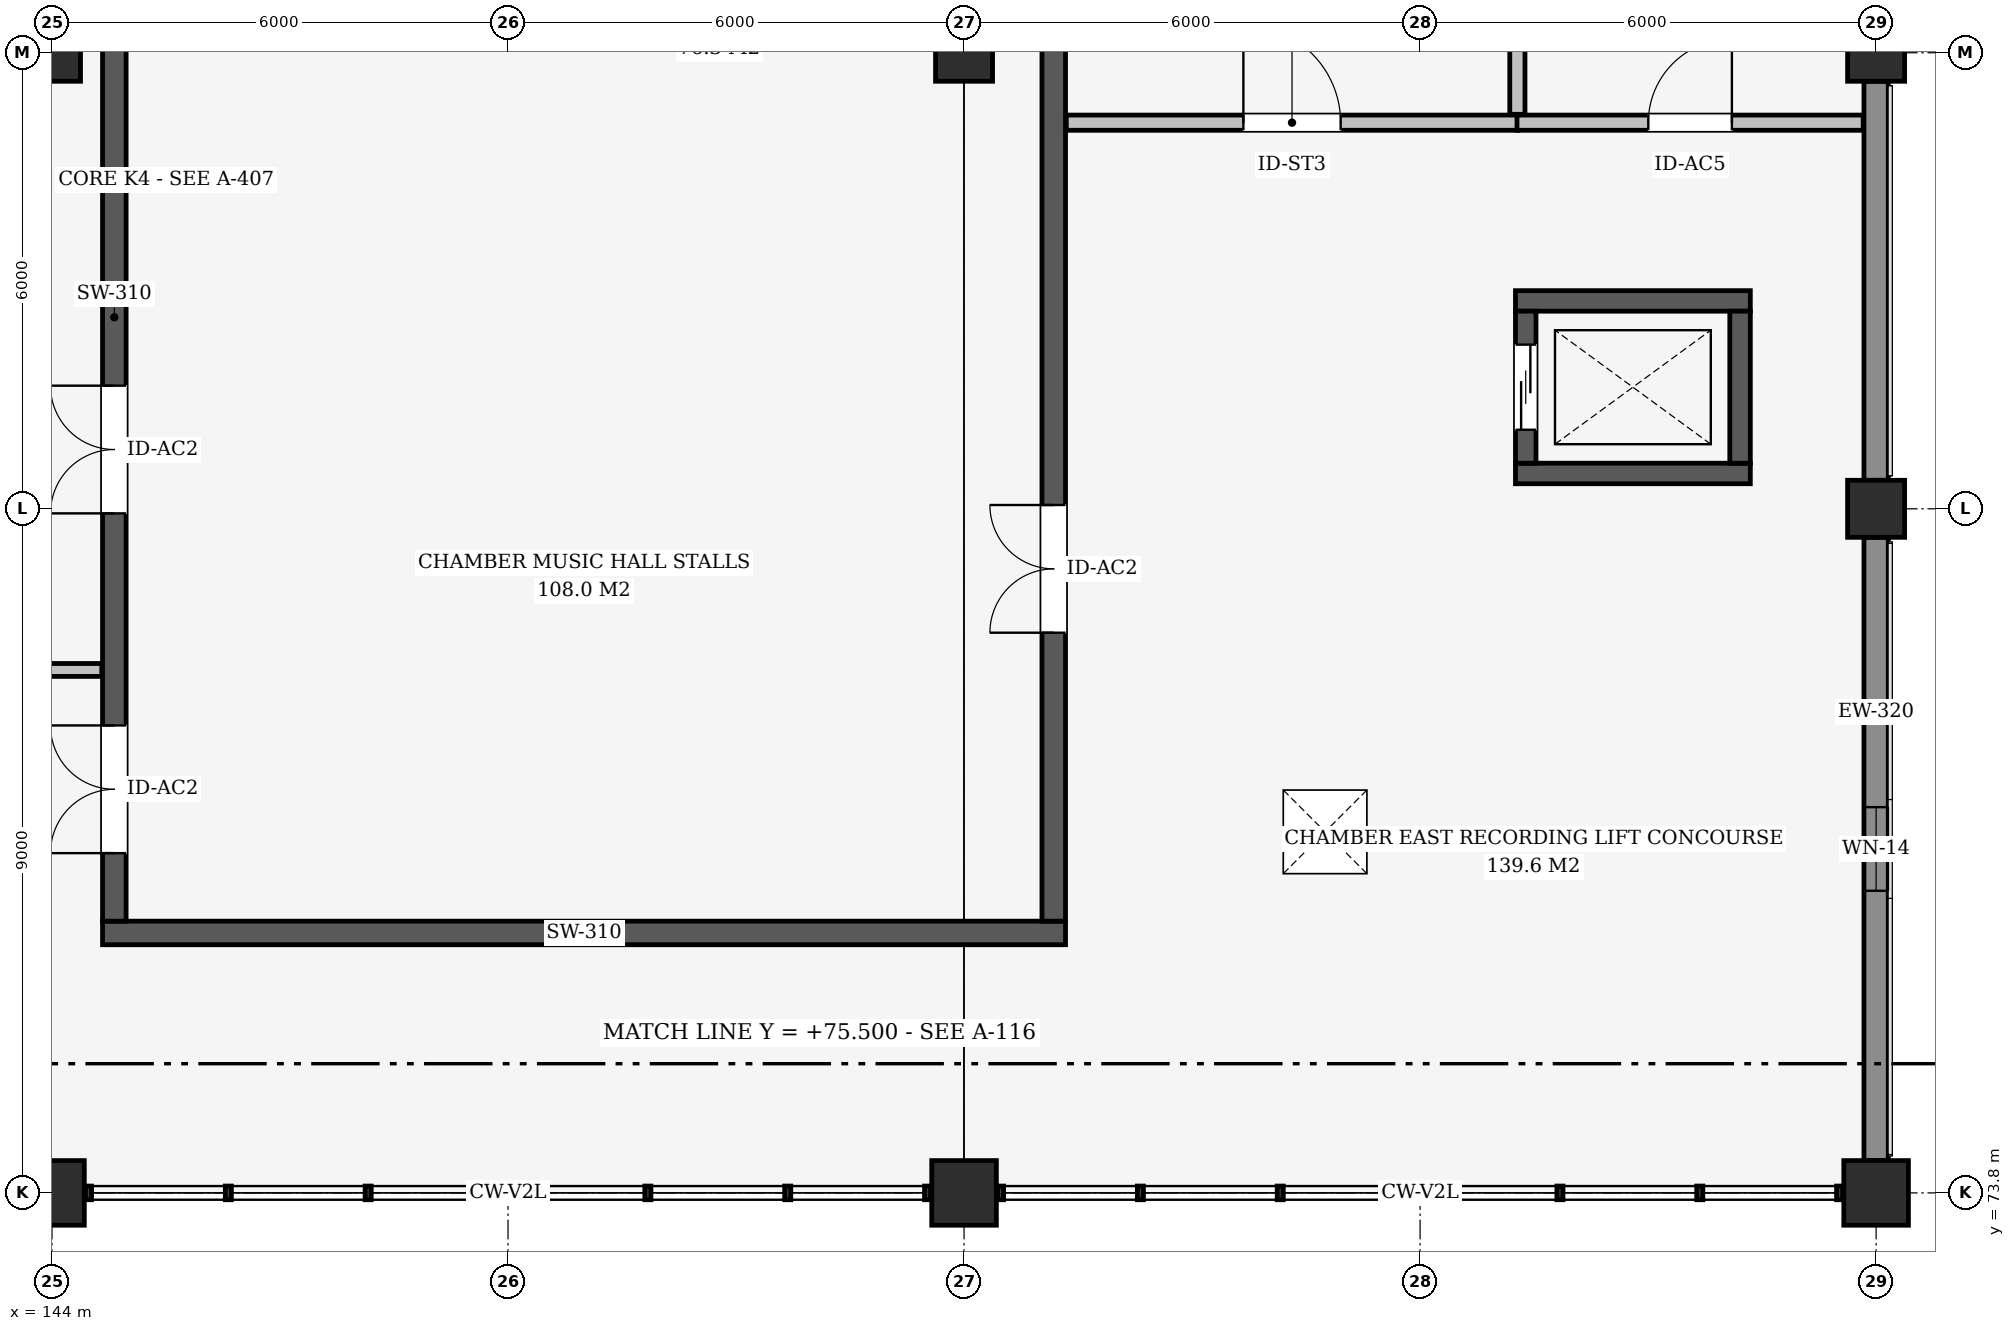
"""IFC4 building model, lengths in metres.
Left out: names, types, materials, properties, quantities, classifications, styles, units other than length and angle.
Written with IfcOpenShell. Run it as: python <this file> out.ifc"""

import sys

from ifc_helpers import new_model, si_unit, direction, frame, frame_2d, origin, origin_2d, place, context, subcontext, project, spatial, rectangle, extrude, element, fill, save


model = new_model("IFC4")
c1 = context("Model", 3, precision=1e-05, world=origin(), true_north=direction((0.0, 1.0)))
c2 = subcontext(c1, "Body", "Model", "MODEL_VIEW")
j1 = project(units=[si_unit("LENGTHUNIT", "METRE"), si_unit("PLANEANGLEUNIT", "RADIAN")], contexts=[c1])
p1 = place(None, origin())
s1 = spatial("IfcSite", under=j1, at=p1, CompositionType="ELEMENT")
p2 = place(p1, origin())
s2 = spatial("IfcBuilding", under=s1, at=p2, CompositionType="ELEMENT")
p3 = place(p2, origin())
s3 = spatial("IfcBuildingStorey", under=s2, at=p3, CompositionType="ELEMENT", Elevation=0.0)
p4 = place(p3, frame((144.0, 73.8, 0.0), z_axis=(0.0, 0.0, 1.0), x_axis=(1.0, 0.0, 0.0)))
e1 = element("IfcColumn", 1, at=p4, inside=s3, PredefinedType="COLUMN", context=c2, shape_type="SweptSolid", body=[
    extrude(rectangle(XDim=0.85, YDim=0.85, at=origin_2d()), origin(), (0.0, 0.0, 1.0), 4.8),
])
p5 = place(p3, frame((144.0, 88.8, 0.0), z_axis=(0.0, 0.0, 1.0), x_axis=(1.0, 0.0, 0.0)))
e2 = element("IfcColumn", 2, at=p5, inside=s3, PredefinedType="COLUMN", context=c2, shape_type="SweptSolid", body=[
    extrude(rectangle(XDim=0.75, YDim=0.75, at=origin_2d()), origin(), (0.0, 0.0, 1.0), 4.8),
])
p6 = place(p3, frame((156.0, 73.8, 0.0), z_axis=(0.0, 0.0, 1.0), x_axis=(1.0, 0.0, 0.0)))
e3 = element("IfcColumn", 3, at=p6, inside=s3, PredefinedType="COLUMN", context=c2, shape_type="SweptSolid", body=[
    extrude(rectangle(XDim=0.85, YDim=0.85, at=origin_2d()), origin(), (0.0, 0.0, 1.0), 4.8),
])
p7 = place(p3, frame((156.0, 88.8, 0.0), z_axis=(0.0, 0.0, 1.0), x_axis=(1.0, 0.0, 0.0)))
e4 = element("IfcColumn", 4, at=p7, inside=s3, PredefinedType="COLUMN", context=c2, shape_type="SweptSolid", body=[
    extrude(rectangle(XDim=0.75, YDim=0.75, at=origin_2d()), origin(), (0.0, 0.0, 1.0), 4.8),
])
p8 = place(p3, frame((168.0, 73.8, 0.0), z_axis=(0.0, 0.0, 1.0), x_axis=(1.0, 0.0, 0.0)))
e5 = element("IfcColumn", 5, at=p8, inside=s3, PredefinedType="COLUMN", context=c2, shape_type="SweptSolid", body=[
    extrude(rectangle(XDim=0.85, YDim=0.85, at=origin_2d()), origin(), (0.0, 0.0, 1.0), 4.8),
])
for number, where, z_axis, x_axis in (
    (6, (168.0, 82.8, 0.0), (0.0, 0.0, 1.0), (1.0, 0.0, 0.0)),
    (7, (168.0, 88.8, 0.0), (0.0, 0.0, 1.0), (1.0, 0.0, 0.0)),
):
    element("IfcColumn", number, at=place(p3, frame(where, z_axis=z_axis, x_axis=x_axis)), inside=s3, PredefinedType="COLUMN", context=c2, shape_type="SweptSolid", body=[
        extrude(rectangle(XDim=0.75, YDim=0.75, at=origin_2d()), origin(), (0.0, 0.0, 1.0), 4.8),
    ])
p9 = place(p3, frame((144.665, 77.22, 0.0), z_axis=(0.0, 0.0, 1.0), x_axis=(1.0, 0.0, 0.0)))
e8 = element("IfcWall", 8, at=p9, inside=s3, PredefinedType="SHEAR", context=c2, shape_type="SweptSolid", body=[
    extrude(rectangle(XDim=12.67, YDim=0.31, at=frame_2d((6.335, 0.0))), origin(), (0.0, 0.0, 1.0), 4.5),
])
p10 = place(p3, frame((144.82, 77.375, 0.0), z_axis=(0.0, 0.0, 1.0), x_axis=(0.0, 1.0, 0.0)))
e9 = element("IfcWall", 9, at=p10, inside=s3, PredefinedType="SHEAR", context=c2, shape_type="SweptSolid", body=[
    extrude(rectangle(XDim=15.89, YDim=0.31, at=frame_2d((7.945, 0.0))), origin(), (0.0, 0.0, 1.0), 4.5),
])
p11 = place(p10, frame((0.895, 0.0, 0.0)))
e10 = element("IfcOpeningElement", 10, at=p11, cuts=e9, PredefinedType="OPENING", context=c2, shape_type="SweptSolid", body=[
    extrude(rectangle(XDim=1.68, YDim=2.32, at=frame_2d((0.84, 1.16))), frame((0.0, 0.165, 0.0), z_axis=(0.0, -1.0, 0.0), x_axis=(1.0, 0.0, 0.0)), (0.0, 0.0, 1.0), 0.33),
])
p12 = place(p10, frame((5.365, 0.0, 0.0)))
e11 = element("IfcOpeningElement", 11, at=p12, cuts=e9, PredefinedType="OPENING", context=c2, shape_type="SweptSolid", body=[
    extrude(rectangle(XDim=1.68, YDim=2.32, at=frame_2d((0.84, 1.16))), frame((0.0, 0.165, 0.0), z_axis=(0.0, -1.0, 0.0), x_axis=(1.0, 0.0, 0.0)), (0.0, 0.0, 1.0), 0.33),
])
p13 = place(p10, frame((12.458, 0.0, 0.0)))
e12 = element("IfcOpeningElement", 12, at=p13, cuts=e9, PredefinedType="OPENING", context=c2, shape_type="SweptSolid", body=[
    extrude(rectangle(XDim=1.68, YDim=2.32, at=frame_2d((0.84, 1.16))), frame((0.0, 0.165, 0.0), z_axis=(0.0, -1.0, 0.0), x_axis=(1.0, 0.0, 0.0)), (0.0, 0.0, 1.0), 0.33),
])
p14 = place(p3, frame((157.18, 77.375, 0.0), z_axis=(0.0, 0.0, 1.0), x_axis=(0.0, 1.0, 0.0)))
e13 = element("IfcWall", 13, at=p14, inside=s3, PredefinedType="SHEAR", context=c2, shape_type="SweptSolid", body=[
    extrude(rectangle(XDim=15.89, YDim=0.31, at=frame_2d((7.945, 0.0))), origin(), (0.0, 0.0, 1.0), 4.5),
])
p15 = place(p14, frame((3.795, 0.0, 0.0)))
e14 = element("IfcOpeningElement", 14, at=p15, cuts=e13, PredefinedType="OPENING", context=c2, shape_type="SweptSolid", body=[
    extrude(rectangle(XDim=1.68, YDim=2.32, at=frame_2d((0.84, 1.16))), frame((0.0, 0.165, 0.0), z_axis=(0.0, -1.0, 0.0), x_axis=(1.0, 0.0, 0.0)), (0.0, 0.0, 1.0), 0.33),
])
p16 = place(p3, frame((168.0, 82.425, 0.0), z_axis=(0.0, 0.0, 1.0), x_axis=(0.0, -1.0, 0.0)))
e15 = element("IfcWall", 15, at=p16, inside=s3, PredefinedType="SOLIDWALL", context=c2, shape_type="SweptSolid", body=[
    extrude(rectangle(XDim=8.2, YDim=0.32, at=frame_2d((4.1, 0.0))), origin(), (0.0, 0.0, 1.0), 3.909),
])
p17 = place(p16, frame((3.55, 0.0, 0.6)))
e16 = element("IfcOpeningElement", 16, at=p17, cuts=e15, PredefinedType="OPENING", context=c2, shape_type="SweptSolid", body=[
    extrude(rectangle(XDim=1.1, YDim=2.4, at=frame_2d((0.55, 1.2))), frame((0.0, 0.17, 0.0), z_axis=(0.0, -1.0, 0.0), x_axis=(1.0, 0.0, 0.0)), (0.0, 0.0, 1.0), 0.34),
])
p18 = place(p3, frame((168.0, 88.425, 0.0), z_axis=(0.0, 0.0, 1.0), x_axis=(0.0, -1.0, 0.0)))
e17 = element("IfcWall", 17, at=p18, inside=s3, PredefinedType="SOLIDWALL", context=c2, shape_type="SweptSolid", body=[
    extrude(rectangle(XDim=5.25, YDim=0.32, at=frame_2d((2.625, 0.0))), origin(), (0.0, 0.0, 1.0), 3.908),
])
for number, where, z_axis, x_axis in (
    (18, (163.255, 83.265, 0.0), (0.0, 0.0, 1.0), (1.0, 0.0, 0.0)),
    (19, (163.255, 85.535, 0.0), (0.0, 0.0, 1.0), (1.0, 0.0, 0.0)),
):
    element("IfcWall", number, at=place(p3, frame(where, z_axis=z_axis, x_axis=x_axis)), inside=s3, PredefinedType="SHEAR", context=c2, shape_type="SweptSolid", body=[
        extrude(rectangle(XDim=3.09, YDim=0.27, at=frame_2d((1.545, 0.0))), origin(), (0.0, 0.0, 1.0), 4.54),
    ])
p19 = place(p3, frame((163.39, 83.4, 0.0), z_axis=(0.0, 0.0, 1.0), x_axis=(0.0, 1.0, 0.0)))
e20 = element("IfcWall", 20, at=p19, inside=s3, PredefinedType="SHEAR", context=c2, shape_type="SweptSolid", body=[
    extrude(rectangle(XDim=2.0, YDim=0.27, at=frame_2d((1.0, 0.0))), origin(), (0.0, 0.0, 1.0), 4.54),
])
p20 = place(p19, frame((0.44, 0.0, 0.0)))
e21 = element("IfcOpeningElement", 21, at=p20, cuts=e20, PredefinedType="OPENING", context=c2, shape_type="SweptSolid", body=[
    extrude(rectangle(XDim=1.12, YDim=2.15, at=frame_2d((0.56, 1.075))), frame((0.0, 0.145, 0.0), z_axis=(0.0, -1.0, 0.0), x_axis=(1.0, 0.0, 0.0)), (0.0, 0.0, 1.0), 0.29),
])
p21 = place(p3, frame((166.21, 83.4, 0.0), z_axis=(0.0, 0.0, 1.0), x_axis=(0.0, 1.0, 0.0)))
e22 = element("IfcWall", 22, at=p21, inside=s3, PredefinedType="SHEAR", context=c2, shape_type="SweptSolid", body=[
    extrude(rectangle(XDim=2.0, YDim=0.27, at=frame_2d((1.0, 0.0))), origin(), (0.0, 0.0, 1.0), 4.54),
])
p22 = place(p3, frame((131.95, 80.68, 0.0), z_axis=(0.0, 0.0, 1.0), x_axis=(1.0, 0.0, 0.0)))
e23 = element("IfcWall", 23, at=p22, inside=s3, PredefinedType="PARTITIONING", context=c2, shape_type="SweptSolid", body=[
    extrude(rectangle(XDim=12.705, YDim=0.17, at=frame_2d((6.353, 0.0))), origin(), (0.0, 0.0, 1.0), 4.52),
])
p23 = place(p3, frame((157.345, 87.88, 0.0), z_axis=(0.0, 0.0, 1.0), x_axis=(1.0, 0.0, 0.0)))
e24 = element("IfcWall", 24, at=p23, inside=s3, PredefinedType="PARTITIONING", context=c2, shape_type="SweptSolid", body=[
    extrude(rectangle(XDim=5.94, YDim=0.2, at=frame_2d((2.97, 0.0))), origin(), (0.0, 0.0, 1.0), 4.52),
])
p24 = place(p23, frame((2.33, 0.0, 0.0)))
e25 = element("IfcOpeningElement", 25, at=p24, cuts=e24, PredefinedType="OPENING", context=c2, shape_type="SweptSolid", body=[
    extrude(rectangle(XDim=1.28, YDim=2.26, at=frame_2d((0.64, 1.13))), frame((0.0, 0.11, 0.0), z_axis=(0.0, -1.0, 0.0), x_axis=(1.0, 0.0, 0.0)), (0.0, 0.0, 1.0), 0.22),
])
p25 = place(p3, frame((163.275, 87.88, 0.0), z_axis=(0.0, 0.0, 1.0), x_axis=(1.0, 0.0, 0.0)))
e26 = element("IfcWall", 26, at=p25, inside=s3, PredefinedType="PARTITIONING", context=c2, shape_type="SweptSolid", body=[
    extrude(rectangle(XDim=4.555, YDim=0.2, at=frame_2d((2.278, 0.0))), origin(), (0.0, 0.0, 1.0), 4.52),
])
p26 = place(p25, frame((1.728, 0.0, 0.0)))
e27 = element("IfcOpeningElement", 27, at=p26, cuts=e26, PredefinedType="OPENING", context=c2, shape_type="SweptSolid", body=[
    extrude(rectangle(XDim=1.1, YDim=2.26, at=frame_2d((0.55, 1.13))), frame((0.0, 0.11, 0.0), z_axis=(0.0, -1.0, 0.0), x_axis=(1.0, 0.0, 0.0)), (0.0, 0.0, 1.0), 0.22),
])
p27 = place(p3, frame((163.28, 87.99, 0.0), z_axis=(0.0, 0.0, 1.0), x_axis=(0.0, 1.0, 0.0)))
e28 = element("IfcWall", 28, at=p27, inside=s3, PredefinedType="PARTITIONING", context=c2, shape_type="SweptSolid", body=[
    extrude(rectangle(XDim=9.04, YDim=0.2, at=frame_2d((4.52, 0.0))), origin(), (0.0, 0.0, 1.0), 3.984),
])
p28 = place(p27, frame((3.97, 0.0, 0.0)))
e29 = element("IfcOpeningElement", 29, at=p28, cuts=e28, PredefinedType="OPENING", context=c2, shape_type="SweptSolid", body=[
    extrude(rectangle(XDim=1.1, YDim=2.26, at=frame_2d((0.55, 1.13))), frame((0.0, 0.11, 0.0), z_axis=(0.0, -1.0, 0.0), x_axis=(1.0, 0.0, 0.0)), (0.0, 0.0, 1.0), 0.22),
])
p29 = place(p17, origin())
e30 = element("IfcWindow", 30, at=p29, inside=s3, PartitioningType="SINGLE_PANEL", PredefinedType="WINDOW", context=c2, shape_type="SweptSolid", body=[
    extrude(rectangle(XDim=1.1, YDim=2.4, at=frame_2d((0.55, 1.2))), frame((0.0, 0.03, 0.0), z_axis=(0.0, -1.0, 0.0), x_axis=(1.0, 0.0, 0.0)), (0.0, 0.0, 1.0), 0.06),
])
fill(e16, e30)
p30 = place(p20, origin())
e31 = element("IfcDoor", 31, at=p30, inside=s3, OperationType="SLIDING_TO_LEFT", PredefinedType="DOOR", context=c2, shape_type="SweptSolid", body=[
    extrude(rectangle(XDim=1.12, YDim=2.15, at=frame_2d((0.56, 1.075))), frame((0.0, 0.025, 0.0), z_axis=(0.0, -1.0, 0.0), x_axis=(1.0, 0.0, 0.0)), (0.0, 0.0, 1.0), 0.05),
])
fill(e21, e31)
p31 = place(p11, origin())
e32 = element("IfcDoor", 32, at=p31, inside=s3, OperationType="DOUBLE_DOOR_SINGLE_SWING", PredefinedType="DOOR", context=c2, shape_type="SweptSolid", body=[
    extrude(rectangle(XDim=1.68, YDim=2.32, at=frame_2d((0.84, 1.16))), frame((0.0, 0.025, 0.0), z_axis=(0.0, -1.0, 0.0), x_axis=(1.0, 0.0, 0.0)), (0.0, 0.0, 1.0), 0.05),
])
fill(e10, e32)
p32 = place(p12, origin())
e33 = element("IfcDoor", 33, at=p32, inside=s3, OperationType="DOUBLE_DOOR_SINGLE_SWING", PredefinedType="DOOR", context=c2, shape_type="SweptSolid", body=[
    extrude(rectangle(XDim=1.68, YDim=2.32, at=frame_2d((0.84, 1.16))), frame((0.0, 0.025, 0.0), z_axis=(0.0, -1.0, 0.0), x_axis=(1.0, 0.0, 0.0)), (0.0, 0.0, 1.0), 0.05),
])
fill(e11, e33)
p33 = place(p15, origin())
e34 = element("IfcDoor", 34, at=p33, inside=s3, OperationType="DOUBLE_DOOR_SINGLE_SWING", PredefinedType="DOOR", context=c2, shape_type="SweptSolid", body=[
    extrude(rectangle(XDim=1.68, YDim=2.32, at=frame_2d((0.84, 1.16))), frame((0.0, 0.025, 0.0), z_axis=(0.0, -1.0, 0.0), x_axis=(1.0, 0.0, 0.0)), (0.0, 0.0, 1.0), 0.05),
])
fill(e14, e34)
p34 = place(p24, origin())
e35 = element("IfcDoor", 35, at=p34, inside=s3, OperationType="SINGLE_SWING_LEFT", PredefinedType="DOOR", context=c2, shape_type="SweptSolid", body=[
    extrude(rectangle(XDim=1.28, YDim=2.26, at=frame_2d((0.64, 1.13))), frame((0.0, 0.025, 0.0), z_axis=(0.0, -1.0, 0.0), x_axis=(1.0, 0.0, 0.0)), (0.0, 0.0, 1.0), 0.05),
])
fill(e25, e35)
p35 = place(p26, origin())
e36 = element("IfcDoor", 36, at=p35, inside=s3, OperationType="SINGLE_SWING_RIGHT", PredefinedType="DOOR", context=c2, shape_type="SweptSolid", body=[
    extrude(rectangle(XDim=1.1, YDim=2.26, at=frame_2d((0.55, 1.13))), frame((0.0, 0.025, 0.0), z_axis=(0.0, -1.0, 0.0), x_axis=(1.0, 0.0, 0.0)), (0.0, 0.0, 1.0), 0.05),
])
fill(e27, e36)
save(model, sys.argv[1])
